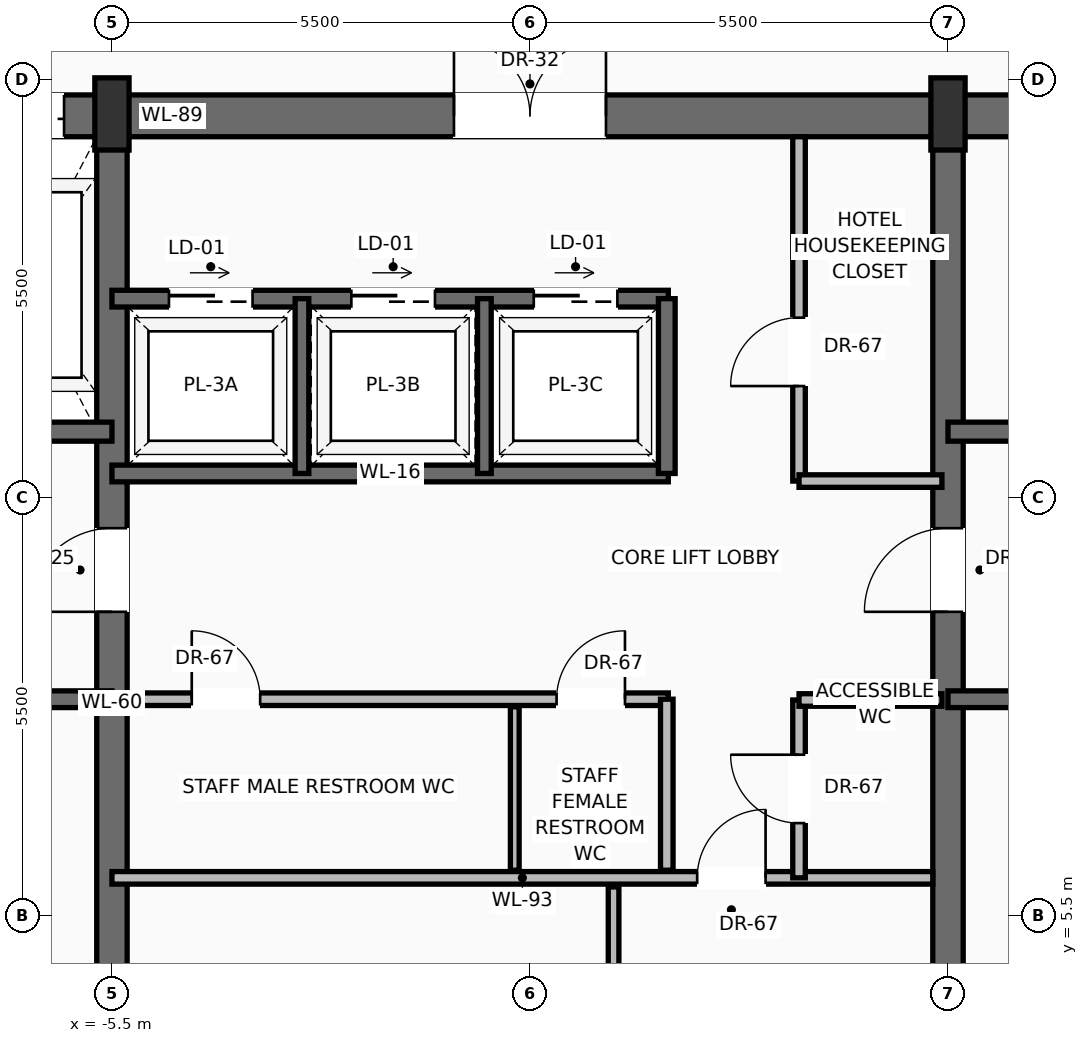
"""IFC4 building model, lengths in metres.
Left out: names, types, materials, properties, quantities, classifications, styles, units other than length and angle.
Written with IfcOpenShell. Run it as: python <this file> out.ifc"""

import sys

from ifc_helpers import new_model, si_unit, direction, frame, frame_2d, origin, origin_2d, place, context, subcontext, project, spatial, rectangle, extrude, source, transform, mapped, element, fill, save


model = new_model("IFC4")
c1 = context("Model", 3, precision=1e-05, world=origin(), true_north=direction((0.0, 1.0)))
c2 = subcontext(c1, "Body", "Model", "MODEL_VIEW")
j1 = project(units=[si_unit("LENGTHUNIT", "METRE"), si_unit("PLANEANGLEUNIT", "RADIAN")], contexts=[c1])
p1 = place(None, origin())
s1 = spatial("IfcSite", under=j1, at=p1, CompositionType="ELEMENT")
p2 = place(p1, origin())
s2 = spatial("IfcBuilding", under=s1, at=p2, CompositionType="ELEMENT")
p3 = place(p2, frame((0.0, 0.0, 251.05)))
s3 = spatial("IfcBuildingStorey", under=s2, at=p3, CompositionType="ELEMENT", Elevation=251.05)
p4 = place(p3, frame((-10.7, 16.025, 0.0), z_axis=(0.0, 0.0, 1.0), x_axis=(1.0, 0.0, 0.0)))
e1 = element("IfcWall", 1, at=p4, inside=s3, PredefinedType="SHEAR", context=c2, shape_type="SweptSolid", body=[
    extrude(rectangle(XDim=21.4, YDim=0.55, at=frame_2d((10.7, 0.0))), origin(), (0.0, 0.0, 1.0), 3.24),
])
p5 = place(p4, frame((3.27, 0.0, 0.0)))
e2 = element("IfcOpeningElement", 2, at=p5, cuts=e1, PredefinedType="OPENING", context=c2, shape_type="SweptSolid", body=[
    extrude(rectangle(XDim=1.3, YDim=2.3, at=frame_2d((0.65, 1.15))), frame((0.0, 0.285, 0.0), z_axis=(0.0, -1.0, 0.0), x_axis=(1.0, 0.0, 0.0)), (0.0, 0.0, 1.0), 0.57),
])
p6 = place(p4, frame((9.7, 0.0, 0.0)))
e3 = element("IfcOpeningElement", 3, at=p6, cuts=e1, PredefinedType="OPENING", context=c2, shape_type="SweptSolid", body=[
    extrude(rectangle(XDim=2.0, YDim=2.4, at=frame_2d((1.0, 1.2))), frame((0.0, 0.285, 0.0), z_axis=(0.0, -1.0, 0.0), x_axis=(1.0, 0.0, 0.0)), (0.0, 0.0, 1.0), 0.57),
])
p7 = place(p3, frame((-5.5, 0.575, 0.0), z_axis=(0.0, 0.0, 1.0), x_axis=(0.0, 1.0, 0.0)))
e4 = element("IfcWall", 4, at=p7, inside=s3, PredefinedType="SHEAR", context=c2, shape_type="SweptSolid", body=[
    extrude(rectangle(XDim=15.45, YDim=0.4, at=frame_2d((7.725, 0.0))), origin(), (0.0, 0.0, 1.0), 3.24),
])
p8 = place(p7, frame((8.925, 0.0, 0.0)))
e5 = element("IfcOpeningElement", 5, at=p8, cuts=e4, PredefinedType="OPENING", context=c2, shape_type="SweptSolid", body=[
    extrude(rectangle(XDim=1.1, YDim=2.2, at=frame_2d((0.55, 1.1))), frame((0.0, 0.21, 0.0), z_axis=(0.0, -1.0, 0.0), x_axis=(1.0, 0.0, 0.0)), (0.0, 0.0, 1.0), 0.42),
])
p9 = place(p3, frame((5.5, 0.575, 0.0), z_axis=(0.0, 0.0, 1.0), x_axis=(0.0, 1.0, 0.0)))
e6 = element("IfcWall", 6, at=p9, inside=s3, PredefinedType="SHEAR", context=c2, shape_type="SweptSolid", body=[
    extrude(rectangle(XDim=15.45, YDim=0.4, at=frame_2d((7.725, 0.0))), origin(), (0.0, 0.0, 1.0), 3.24),
])
p10 = place(p9, frame((8.925, 0.0, 0.0)))
e7 = element("IfcOpeningElement", 7, at=p10, cuts=e6, PredefinedType="OPENING", context=c2, shape_type="SweptSolid", body=[
    extrude(rectangle(XDim=1.1, YDim=2.2, at=frame_2d((0.55, 1.1))), frame((0.0, 0.21, 0.0), z_axis=(0.0, -1.0, 0.0), x_axis=(1.0, 0.0, 0.0)), (0.0, 0.0, 1.0), 0.42),
])
m1 = source(origin(), c2, "Body", "SweptSolid", [
    extrude(rectangle(XDim=0.45, YDim=0.95, at=origin_2d()), origin(), (0.0, 0.0, 1.0), 3.45),
])
for number, where, z_axis, x_axis in (
    (8, (-5.5, 16.05, 0.0), (0.0, 0.0, 1.0), (1.0, 0.0, 0.0)),
    (9, (5.5, 16.05, 0.0), (0.0, 0.0, 1.0), (1.0, 0.0, 0.0)),
):
    element("IfcColumn", number, at=place(p3, frame(where, z_axis=z_axis, x_axis=x_axis)), inside=s3, PredefinedType="PILASTER", context=c2, shape_type="MappedRepresentation", body=[
        mapped(m1, transform((0.0, 0.0, 0.0), scale=1.0)),
    ])
p11 = place(p3, frame((-5.5, 8.35, 0.0), z_axis=(0.0, 0.0, 1.0), x_axis=(-1.0, 0.0, 0.0)))
e10 = element("IfcWall", 10, at=p11, inside=s3, PredefinedType="SOLIDWALL", context=c2, shape_type="SweptSolid", body=[
    extrude(rectangle(XDim=4.65, YDim=0.22, at=frame_2d((2.325, 0.0))), origin(), (0.0, 0.0, 1.0), 3.24),
])
p12 = place(p11, frame((2.5, 0.0, 0.0)))
e11 = element("IfcOpeningElement", 11, at=p12, cuts=e10, PredefinedType="OPENING", context=c2, shape_type="SweptSolid", body=[
    extrude(rectangle(XDim=1.15, YDim=2.2, at=frame_2d((0.575, 1.1))), frame((0.0, 0.12, 0.0), z_axis=(0.0, -1.0, 0.0), x_axis=(1.0, 0.0, 0.0)), (0.0, 0.0, 1.0), 0.24),
])
p13 = place(p3, frame((-5.5, 11.87, 0.0), z_axis=(0.0, 0.0, 1.0), x_axis=(-1.0, 0.0, 0.0)))
e12 = element("IfcWall", 12, at=p13, inside=s3, PredefinedType="SOLIDWALL", context=c2, shape_type="SweptSolid", body=[
    extrude(rectangle(XDim=4.65, YDim=0.25, at=frame_2d((2.325, 0.0))), origin(), (0.0, 0.0, 1.0), 3.24),
])
p14 = place(p13, frame((2.95, 0.0, 0.0)))
e13 = element("IfcOpeningElement", 13, at=p14, cuts=e12, PredefinedType="OPENING", context=c2, shape_type="SweptSolid", body=[
    extrude(rectangle(XDim=1.2, YDim=2.25, at=frame_2d((0.6, 1.125))), frame((0.0, 0.135, 0.0), z_axis=(0.0, -1.0, 0.0), x_axis=(1.0, 0.0, 0.0)), (0.0, 0.0, 1.0), 0.27),
])
p15 = place(p3, frame((10.15, 8.35, 0.0), z_axis=(0.0, 0.0, 1.0), x_axis=(-1.0, 0.0, 0.0)))
e14 = element("IfcWall", 14, at=p15, inside=s3, PredefinedType="SOLIDWALL", context=c2, shape_type="SweptSolid", body=[
    extrude(rectangle(XDim=4.65, YDim=0.22, at=frame_2d((2.325, 0.0))), origin(), (0.0, 0.0, 1.0), 3.24),
])
p16 = place(p15, frame((1.0, 0.0, 0.0)))
e15 = element("IfcOpeningElement", 15, at=p16, cuts=e14, PredefinedType="OPENING", context=c2, shape_type="SweptSolid", body=[
    extrude(rectangle(XDim=1.15, YDim=2.2, at=frame_2d((0.575, 1.1))), frame((0.0, 0.12, 0.0), z_axis=(0.0, -1.0, 0.0), x_axis=(1.0, 0.0, 0.0)), (0.0, 0.0, 1.0), 0.24),
])
p17 = place(p3, frame((10.15, 11.87, 0.0), z_axis=(0.0, 0.0, 1.0), x_axis=(-1.0, 0.0, 0.0)))
e16 = element("IfcWall", 16, at=p17, inside=s3, PredefinedType="SOLIDWALL", context=c2, shape_type="SweptSolid", body=[
    extrude(rectangle(XDim=4.65, YDim=0.25, at=frame_2d((2.325, 0.0))), origin(), (0.0, 0.0, 1.0), 3.24),
])
p18 = place(p17, frame((0.5, 0.0, 0.0)))
e17 = element("IfcOpeningElement", 17, at=p18, cuts=e16, PredefinedType="OPENING", context=c2, shape_type="SweptSolid", body=[
    extrude(rectangle(XDim=1.2, YDim=2.25, at=frame_2d((0.6, 1.125))), frame((0.0, 0.135, 0.0), z_axis=(0.0, -1.0, 0.0), x_axis=(1.0, 0.0, 0.0)), (0.0, 0.0, 1.0), 0.27),
])
p19 = place(p3, frame((-5.5, 6.0, 0.0), z_axis=(0.0, 0.0, 1.0), x_axis=(1.0, 0.0, 0.0)))
e18 = element("IfcWall", 18, at=p19, inside=s3, PredefinedType="PARTITIONING", context=c2, shape_type="SweptSolid", body=[
    extrude(rectangle(XDim=10.8, YDim=0.165, at=frame_2d((5.4, 0.0))), origin(), (0.0, 0.0, 1.0), 3.232),
])
p20 = place(p19, frame((7.7, 0.0, 0.0)))
e19 = element("IfcOpeningElement", 19, at=p20, cuts=e18, PredefinedType="OPENING", context=c2, shape_type="SweptSolid", body=[
    extrude(rectangle(XDim=0.9, YDim=2.1, at=frame_2d((0.45, 1.05))), frame((0.0, 0.093, 0.0), z_axis=(0.0, -1.0, 0.0), x_axis=(1.0, 0.0, 0.0)), (0.0, 0.0, 1.0), 0.185),
])
p21 = place(p3, frame((1.1, 0.85, 0.0), z_axis=(0.0, 0.0, 1.0), x_axis=(0.0, 1.0, 0.0)))
e20 = element("IfcWall", 20, at=p21, inside=s3, PredefinedType="PARTITIONING", context=c2, shape_type="SweptSolid", body=[
    extrude(rectangle(XDim=5.03, YDim=0.14, at=frame_2d((2.515, 0.0))), origin(), (0.0, 0.0, 1.0), 3.232),
])
p22 = place(p21, frame((2.1, 0.0, 0.0)))
e21 = element("IfcOpeningElement", 21, at=p22, cuts=e20, PredefinedType="OPENING", context=c2, shape_type="SweptSolid", body=[
    extrude(rectangle(XDim=0.9, YDim=2.1, at=frame_2d((0.45, 1.05))), frame((0.0, 0.08, 0.0), z_axis=(0.0, -1.0, 0.0), x_axis=(1.0, 0.0, 0.0)), (0.0, 0.0, 1.0), 0.16),
])
p23 = place(p3, frame((3.54, 6.0, 0.0), z_axis=(0.0, 0.0, 1.0), x_axis=(0.0, 1.0, 0.0)))
e22 = element("IfcWall", 22, at=p23, inside=s3, PredefinedType="PARTITIONING", context=c2, shape_type="SweptSolid", body=[
    extrude(rectangle(XDim=2.34, YDim=0.165, at=frame_2d((1.17, 0.0))), origin(), (0.0, 0.0, 1.0), 3.232),
])
p24 = place(p23, frame((0.72, 0.0, 0.0)))
e23 = element("IfcOpeningElement", 23, at=p24, cuts=e22, PredefinedType="OPENING", context=c2, shape_type="SweptSolid", body=[
    extrude(rectangle(XDim=0.9, YDim=2.1, at=frame_2d((0.45, 1.05))), frame((0.0, 0.093, 0.0), z_axis=(0.0, -1.0, 0.0), x_axis=(1.0, 0.0, 0.0)), (0.0, 0.0, 1.0), 0.185),
])
p25 = place(p3, frame((3.54, 8.34, 0.0), z_axis=(0.0, 0.0, 1.0), x_axis=(1.0, 0.0, 0.0)))
e24 = element("IfcWall", 24, at=p25, inside=s3, PredefinedType="PARTITIONING", context=c2, shape_type="SweptSolid", body=[
    extrude(rectangle(XDim=1.88, YDim=0.165, at=frame_2d((0.94, 0.0))), origin(), (0.0, 0.0, 1.0), 3.232),
])
p26 = place(p3, frame((-5.3, 8.35, 0.0), z_axis=(0.0, 0.0, 1.0), x_axis=(1.0, 0.0, 0.0)))
e25 = element("IfcWall", 25, at=p26, inside=s3, PredefinedType="PARTITIONING", context=c2, shape_type="SweptSolid", body=[
    extrude(rectangle(XDim=7.12, YDim=0.165, at=frame_2d((3.56, 0.0))), origin(), (0.0, 0.0, 1.0), 3.232),
])
p27 = place(p26, frame((0.85, 0.0, 0.0)))
e26 = element("IfcOpeningElement", 26, at=p27, cuts=e25, PredefinedType="OPENING", context=c2, shape_type="SweptSolid", body=[
    extrude(rectangle(XDim=0.9, YDim=2.1, at=frame_2d((0.45, 1.05))), frame((0.0, 0.093, 0.0), z_axis=(0.0, -1.0, 0.0), x_axis=(1.0, 0.0, 0.0)), (0.0, 0.0, 1.0), 0.185),
])
p28 = place(p26, frame((5.65, 0.0, 0.0)))
e27 = element("IfcOpeningElement", 27, at=p28, cuts=e25, PredefinedType="OPENING", context=c2, shape_type="SweptSolid", body=[
    extrude(rectangle(XDim=0.9, YDim=2.1, at=frame_2d((0.45, 1.05))), frame((0.0, 0.093, 0.0), z_axis=(0.0, -1.0, 0.0), x_axis=(1.0, 0.0, 0.0)), (0.0, 0.0, 1.0), 0.185),
])
p29 = place(p3, frame((1.8, 6.1, 0.0), z_axis=(0.0, 0.0, 1.0), x_axis=(0.0, 1.0, 0.0)))
e28 = element("IfcWall", 28, at=p29, inside=s3, PredefinedType="PARTITIONING", context=c2, shape_type="SweptSolid", body=[
    extrude(rectangle(XDim=2.25, YDim=0.165, at=frame_2d((1.125, 0.0))), origin(), (0.0, 0.0, 1.0), 3.232),
])
p30 = place(p3, frame((-0.2, 6.1, 0.0), z_axis=(0.0, 0.0, 1.0), x_axis=(0.0, 1.0, 0.0)))
e29 = element("IfcWall", 29, at=p30, inside=s3, PredefinedType="PARTITIONING", context=c2, shape_type="SweptSolid", body=[
    extrude(rectangle(XDim=2.15, YDim=0.115, at=frame_2d((1.075, 0.0))), origin(), (0.0, 0.0, 1.0), 3.232),
])
p31 = place(p3, frame((-5.5, 11.32, 0.0), z_axis=(0.0, 0.0, 1.0), x_axis=(1.0, 0.0, 0.0)))
e30 = element("IfcWall", 30, at=p31, inside=s3, PredefinedType="SOLIDWALL", context=c2, shape_type="SweptSolid", body=[
    extrude(rectangle(XDim=7.32, YDim=0.22, at=frame_2d((3.66, 0.0))), origin(), (0.0, 0.0, 1.0), 3.24),
])
p32 = place(p3, frame((-5.5, 13.62, 0.0), z_axis=(0.0, 0.0, 1.0), x_axis=(1.0, 0.0, 0.0)))
e31 = element("IfcWall", 31, at=p32, inside=s3, PredefinedType="SOLIDWALL", context=c2, shape_type="SweptSolid", body=[
    extrude(rectangle(XDim=7.32, YDim=0.22, at=frame_2d((3.66, 0.0))), origin(), (0.0, 0.0, 1.0), 3.24),
])
p33 = place(p32, frame((0.75, 0.0, 0.0)))
e32 = element("IfcOpeningElement", 32, at=p33, cuts=e31, PredefinedType="OPENING", context=c2, shape_type="SweptSolid", body=[
    extrude(rectangle(XDim=1.1, YDim=2.2, at=frame_2d((0.55, 1.1))), frame((0.0, 0.12, 0.0), z_axis=(0.0, -1.0, 0.0), x_axis=(1.0, 0.0, 0.0)), (0.0, 0.0, 1.0), 0.24),
])
p34 = place(p32, frame((3.15, 0.0, 0.0)))
e33 = element("IfcOpeningElement", 33, at=p34, cuts=e31, PredefinedType="OPENING", context=c2, shape_type="SweptSolid", body=[
    extrude(rectangle(XDim=1.1, YDim=2.2, at=frame_2d((0.55, 1.1))), frame((0.0, 0.12, 0.0), z_axis=(0.0, -1.0, 0.0), x_axis=(1.0, 0.0, 0.0)), (0.0, 0.0, 1.0), 0.24),
])
p35 = place(p32, frame((5.55, 0.0, 0.0)))
e34 = element("IfcOpeningElement", 34, at=p35, cuts=e31, PredefinedType="OPENING", context=c2, shape_type="SweptSolid", body=[
    extrude(rectangle(XDim=1.1, YDim=2.2, at=frame_2d((0.55, 1.1))), frame((0.0, 0.12, 0.0), z_axis=(0.0, -1.0, 0.0), x_axis=(1.0, 0.0, 0.0)), (0.0, 0.0, 1.0), 0.24),
])
p36 = place(p3, frame((1.8, 11.32, 0.0), z_axis=(0.0, 0.0, 1.0), x_axis=(0.0, 1.0, 0.0)))
e35 = element("IfcWall", 35, at=p36, inside=s3, PredefinedType="SOLIDWALL", context=c2, shape_type="SweptSolid", body=[
    extrude(rectangle(XDim=2.3, YDim=0.22, at=frame_2d((1.15, 0.0))), origin(), (0.0, 0.0, 1.0), 3.24),
])
for number, where, z_axis, x_axis in (
    (36, (-3.0, 11.32, 0.0), (0.0, 0.0, 1.0), (0.0, 1.0, 0.0)),
    (37, (-0.6, 11.32, 0.0), (0.0, 0.0, 1.0), (0.0, 1.0, 0.0)),
):
    element("IfcWall", number, at=place(p3, frame(where, z_axis=z_axis, x_axis=x_axis)), inside=s3, PredefinedType="SOLIDWALL", context=c2, shape_type="SweptSolid", body=[
        extrude(rectangle(XDim=2.3, YDim=0.18, at=frame_2d((1.15, 0.0))), origin(), (0.0, 0.0, 1.0), 3.24),
    ])
p37 = place(p3, frame((3.54, 11.22, 0.0), z_axis=(0.0, 0.0, 1.0), x_axis=(0.0, 1.0, 0.0)))
e38 = element("IfcWall", 38, at=p37, inside=s3, PredefinedType="PARTITIONING", context=c2, shape_type="SweptSolid", body=[
    extrude(rectangle(XDim=4.53, YDim=0.165, at=frame_2d((2.265, 0.0))), origin(), (0.0, 0.0, 1.0), 3.232),
])
p38 = place(p37, frame((1.25, 0.0, 0.0)))
e39 = element("IfcOpeningElement", 39, at=p38, cuts=e38, PredefinedType="OPENING", context=c2, shape_type="SweptSolid", body=[
    extrude(rectangle(XDim=0.9, YDim=2.1, at=frame_2d((0.45, 1.05))), frame((0.0, 0.093, 0.0), z_axis=(0.0, -1.0, 0.0), x_axis=(1.0, 0.0, 0.0)), (0.0, 0.0, 1.0), 0.185),
])
p39 = place(p3, frame((3.54, 11.22, 0.0), z_axis=(0.0, 0.0, 1.0), x_axis=(1.0, 0.0, 0.0)))
e40 = element("IfcWall", 40, at=p39, inside=s3, PredefinedType="PARTITIONING", context=c2, shape_type="SweptSolid", body=[
    extrude(rectangle(XDim=1.88, YDim=0.165, at=frame_2d((0.94, 0.0))), origin(), (0.0, 0.0, 1.0), 3.232),
])
m2 = source(origin(), c2, "Body", "SweptSolid", [
    extrude(rectangle(XDim=1.1, YDim=2.2, at=frame_2d((0.55, 1.1))), frame((0.0, 0.025, 0.0), z_axis=(0.0, -1.0, 0.0), x_axis=(1.0, 0.0, 0.0)), (0.0, 0.0, 1.0), 0.05),
])
p40 = place(p8, origin())
e41 = element("IfcDoor", 41, at=p40, inside=s3, OperationType="SINGLE_SWING_LEFT", PredefinedType="DOOR", context=c2, shape_type="MappedRepresentation", body=[
    mapped(m2, transform((0.0, 0.0, 0.0), scale=1.0)),
])
fill(e5, e41)
m3 = source(origin(), c2, "Body", "SweptSolid", [
    extrude(rectangle(XDim=1.3, YDim=2.3, at=frame_2d((0.65, 1.15))), frame((0.0, 0.025, 0.0), z_axis=(0.0, -1.0, 0.0), x_axis=(1.0, 0.0, 0.0)), (0.0, 0.0, 1.0), 0.05),
])
p41 = place(p5, origin())
e42 = element("IfcDoor", 42, at=p41, inside=s3, OperationType="SLIDING_TO_RIGHT", PredefinedType="DOOR", context=c2, shape_type="MappedRepresentation", body=[
    mapped(m3, transform((0.0, 0.0, 0.0), scale=1.0)),
])
fill(e2, e42)
p42 = place(p10, origin())
e43 = element("IfcDoor", 43, at=p42, inside=s3, OperationType="SINGLE_SWING_LEFT", PredefinedType="DOOR", context=c2, shape_type="MappedRepresentation", body=[
    mapped(m2, transform((0.0, 0.0, 0.0), scale=1.0)),
])
fill(e7, e43)
m4 = source(origin(), c2, "Body", "SweptSolid", [
    extrude(rectangle(XDim=2.0, YDim=2.4, at=frame_2d((1.0, 1.2))), frame((0.0, 0.025, 0.0), z_axis=(0.0, -1.0, 0.0), x_axis=(1.0, 0.0, 0.0)), (0.0, 0.0, 1.0), 0.05),
])
p43 = place(p6, origin())
e44 = element("IfcDoor", 44, at=p43, inside=s3, OperationType="DOUBLE_DOOR_SINGLE_SWING", PredefinedType="DOOR", context=c2, shape_type="MappedRepresentation", body=[
    mapped(m4, transform((0.0, 0.0, 0.0), scale=1.0)),
])
fill(e3, e44)
m5 = source(origin(), c2, "Body", "SweptSolid", [
    extrude(rectangle(XDim=0.9, YDim=2.1, at=frame_2d((0.45, 1.05))), frame((0.0, 0.025, 0.0), z_axis=(0.0, -1.0, 0.0), x_axis=(1.0, 0.0, 0.0)), (0.0, 0.0, 1.0), 0.05),
])
p44 = place(p20, origin())
e45 = element("IfcDoor", 45, at=p44, inside=s3, OperationType="SINGLE_SWING_RIGHT", PredefinedType="DOOR", context=c2, shape_type="MappedRepresentation", body=[
    mapped(m5, transform((0.0, 0.0, 0.0), scale=1.0)),
])
fill(e19, e45)
p45 = place(p24, origin())
e46 = element("IfcDoor", 46, at=p45, inside=s3, OperationType="SINGLE_SWING_RIGHT", PredefinedType="DOOR", context=c2, shape_type="MappedRepresentation", body=[
    mapped(m5, transform((0.0, 0.0, 0.0), scale=1.0)),
])
fill(e23, e46)
p46 = place(p27, origin())
e47 = element("IfcDoor", 47, at=p46, inside=s3, OperationType="SINGLE_SWING_LEFT", PredefinedType="DOOR", context=c2, shape_type="MappedRepresentation", body=[
    mapped(m5, transform((0.0, 0.0, 0.0), scale=1.0)),
])
fill(e26, e47)
p47 = place(p28, origin())
e48 = element("IfcDoor", 48, at=p47, inside=s3, OperationType="SINGLE_SWING_RIGHT", PredefinedType="DOOR", context=c2, shape_type="MappedRepresentation", body=[
    mapped(m5, transform((0.0, 0.0, 0.0), scale=1.0)),
])
fill(e27, e48)
m6 = source(origin(), c2, "Body", "SweptSolid", [
    extrude(rectangle(XDim=1.1, YDim=2.2, at=frame_2d((0.55, 1.1))), frame((0.0, 0.025, 0.0), z_axis=(0.0, -1.0, 0.0), x_axis=(1.0, 0.0, 0.0)), (0.0, 0.0, 1.0), 0.05),
])
p48 = place(p33, origin())
e49 = element("IfcDoor", 49, at=p48, inside=s3, OperationType="SLIDING_TO_RIGHT", PredefinedType="DOOR", context=c2, shape_type="MappedRepresentation", body=[
    mapped(m6, transform((0.0, 0.0, 0.0), scale=1.0)),
])
fill(e32, e49)
p49 = place(p34, origin())
e50 = element("IfcDoor", 50, at=p49, inside=s3, OperationType="SLIDING_TO_RIGHT", PredefinedType="DOOR", context=c2, shape_type="MappedRepresentation", body=[
    mapped(m6, transform((0.0, 0.0, 0.0), scale=1.0)),
])
fill(e33, e50)
p50 = place(p35, origin())
e51 = element("IfcDoor", 51, at=p50, inside=s3, OperationType="SLIDING_TO_RIGHT", PredefinedType="DOOR", context=c2, shape_type="MappedRepresentation", body=[
    mapped(m6, transform((0.0, 0.0, 0.0), scale=1.0)),
])
fill(e34, e51)
p51 = place(p38, origin())
e52 = element("IfcDoor", 52, at=p51, inside=s3, OperationType="SINGLE_SWING_LEFT", PredefinedType="DOOR", context=c2, shape_type="MappedRepresentation", body=[
    mapped(m5, transform((0.0, 0.0, 0.0), scale=1.0)),
])
fill(e39, e52)
save(model, sys.argv[1])
